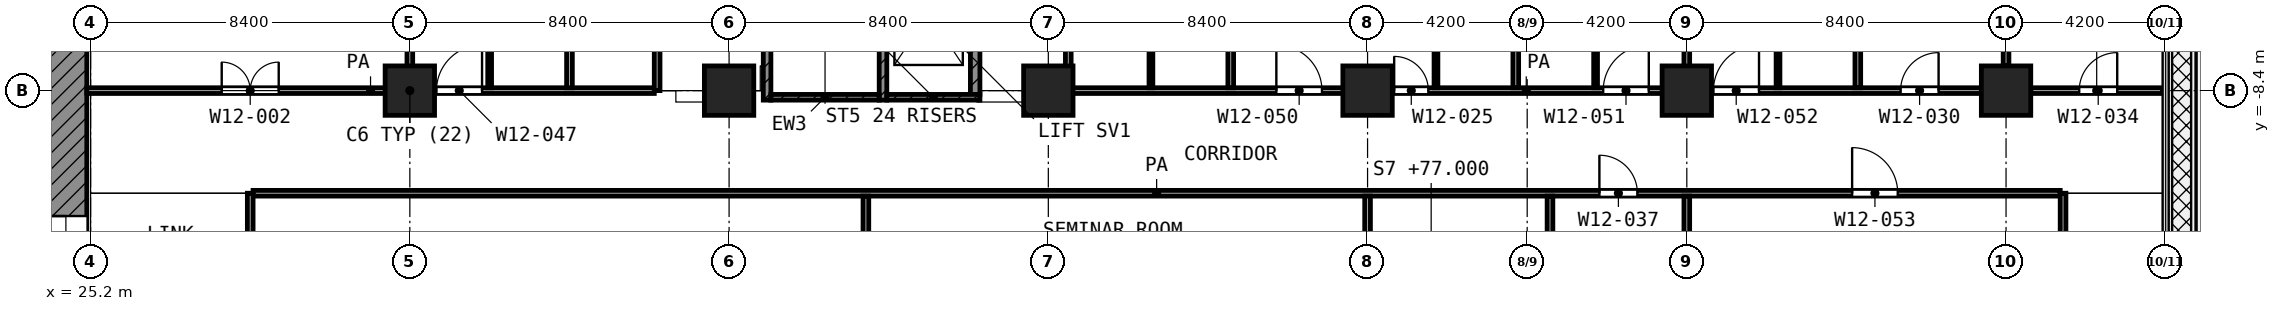
"""IFC4 building model, lengths in metres.
Left out: names, types, materials, properties, quantities, classifications, styles, units other than length and angle.
Written with IfcOpenShell. Run it as: python <this file> out.ifc"""

import sys

from ifc_helpers import new_model, si_unit, direction, frame, frame_2d, origin, origin_2d, place, context, subcontext, project, spatial, rectangle, extrude, element, fill, save


model = new_model("IFC4")
c1 = context("Model", 3, precision=1e-05, world=origin(), true_north=direction((0.0, 1.0)))
c2 = subcontext(c1, "Body", "Model", "MODEL_VIEW")
j1 = project(units=[si_unit("LENGTHUNIT", "METRE"), si_unit("PLANEANGLEUNIT", "RADIAN")], contexts=[c1])
p1 = place(None, origin())
s1 = spatial("IfcSite", under=j1, at=p1, CompositionType="ELEMENT")
p2 = place(p1, origin())
s2 = spatial("IfcBuilding", under=s1, at=p2, CompositionType="ELEMENT")
p3 = place(p2, frame((0.0, 0.0, 77.0)))
s3 = spatial("IfcBuildingStorey", under=s2, at=p3, CompositionType="ELEMENT", Elevation=77.0)
for number, where, z_axis, x_axis in (
    (1, (33.6, -8.4, 0.0), (0.0, 0.0, 1.0), (1.0, 0.0, 0.0)),
    (2, (42.0, -8.4, 0.0), (0.0, 0.0, 1.0), (1.0, 0.0, 0.0)),
    (3, (50.4, -8.4, 0.0), (0.0, 0.0, 1.0), (1.0, 0.0, 0.0)),
    (4, (58.8, -8.4, 0.0), (0.0, 0.0, 1.0), (1.0, 0.0, 0.0)),
    (5, (67.2, -8.4, 0.0), (0.0, 0.0, 1.0), (1.0, 0.0, 0.0)),
    (6, (75.6, -8.4, 0.0), (0.0, 0.0, 1.0), (1.0, 0.0, 0.0)),
):
    element("IfcColumn", number, at=place(p3, frame(where, z_axis=z_axis, x_axis=x_axis)), inside=s3, PredefinedType="COLUMN", context=c2, shape_type="SweptSolid", body=[
        extrude(rectangle(XDim=1.3, YDim=1.3, at=origin_2d()), origin(), (0.0, 0.0, 1.0), 4.2),
    ])
p4 = place(p3, frame((24.55, -24.0, 0.0), z_axis=(0.0, 0.0, 1.0), x_axis=(0.0, 1.0, 0.0)))
e7 = element("IfcWall", 7, at=p4, inside=s3, PredefinedType="SHEAR", context=c2, shape_type="SweptSolid", body=[
    extrude(rectangle(XDim=18.6, YDim=1.1, at=frame_2d((9.3, 0.0))), origin(), (0.0, 0.0, 1.0), 3.9),
])
p5 = place(p4, frame((10.5, 0.0, 0.0)))
e8 = element("IfcOpeningElement", 8, at=p5, cuts=e7, PredefinedType="OPENING", context=c2, shape_type="SweptSolid", body=[
    extrude(rectangle(XDim=1.8, YDim=2.1, at=frame_2d((0.9, 1.05))), frame((0.0, 0.56, 0.0), z_axis=(0.0, -1.0, 0.0), x_axis=(1.0, 0.0, 0.0)), (0.0, 0.0, 1.0), 1.12),
])
p6 = place(p3, frame((43.0, -8.65, 0.0), z_axis=(0.0, 0.0, 1.0), x_axis=(0.0, 1.0, 0.0)))
e9 = element("IfcWall", 9, at=p6, inside=s3, PredefinedType="SHEAR", context=c2, shape_type="SweptSolid", body=[
    extrude(rectangle(XDim=8.35, YDim=0.2, at=frame_2d((4.175, 0.0))), origin(), (0.0, 0.0, 1.0), 3.9),
])
p7 = place(p6, frame((7.0, 0.0, 0.0)))
e10 = element("IfcOpeningElement", 10, at=p7, cuts=e9, PredefinedType="OPENING", context=c2, shape_type="SweptSolid", body=[
    extrude(rectangle(XDim=1.1, YDim=2.1, at=frame_2d((0.55, 1.05))), frame((0.0, 0.11, 0.0), z_axis=(0.0, -1.0, 0.0), x_axis=(1.0, 0.0, 0.0)), (0.0, 0.0, 1.0), 0.22),
])
p8 = place(p3, frame((46.05, -8.65, 0.0), z_axis=(0.0, 0.0, 1.0), x_axis=(0.0, 1.0, 0.0)))
e11 = element("IfcWall", 11, at=p8, inside=s3, PredefinedType="SHEAR", context=c2, shape_type="SweptSolid", body=[
    extrude(rectangle(XDim=8.35, YDim=0.2, at=frame_2d((4.175, 0.0))), origin(), (0.0, 0.0, 1.0), 3.9),
])
p9 = place(p8, frame((7.0, 0.0, 0.0)))
e12 = element("IfcOpeningElement", 12, at=p9, cuts=e11, PredefinedType="OPENING", context=c2, shape_type="SweptSolid", body=[
    extrude(rectangle(XDim=1.1, YDim=2.1, at=frame_2d((0.55, 1.05))), frame((0.0, 0.11, 0.0), z_axis=(0.0, -1.0, 0.0), x_axis=(1.0, 0.0, 0.0)), (0.0, 0.0, 1.0), 0.22),
])
p10 = place(p3, frame((43.1, -8.575, 0.0), z_axis=(0.0, 0.0, 1.0), x_axis=(1.0, 0.0, 0.0)))
e13 = element("IfcWall", 13, at=p10, inside=s3, PredefinedType="SHEAR", context=c2, shape_type="SweptSolid", body=[
    extrude(rectangle(XDim=2.85, YDim=0.15, at=frame_2d((1.425, 0.0))), origin(), (0.0, 0.0, 1.0), 3.9),
])
p11 = place(p3, frame((46.15, -8.575, 0.0), z_axis=(0.0, 0.0, 1.0), x_axis=(1.0, 0.0, 0.0)))
e14 = element("IfcWall", 14, at=p11, inside=s3, PredefinedType="SHEAR", context=c2, shape_type="SweptSolid", body=[
    extrude(rectangle(XDim=2.45, YDim=0.15, at=frame_2d((1.225, 0.0))), origin(), (0.0, 0.0, 1.0), 3.9),
])
p12 = place(p3, frame((48.475, -8.5, 0.0), z_axis=(0.0, 0.0, 1.0), x_axis=(0.0, 1.0, 0.0)))
e15 = element("IfcWall", 15, at=p12, inside=s3, PredefinedType="SHEAR", context=c2, shape_type="SweptSolid", body=[
    extrude(rectangle(XDim=3.475, YDim=0.25, at=frame_2d((1.738, 0.0))), origin(), (0.0, 0.0, 1.0), 3.9),
])
for number, where, z_axis, x_axis in (
    (16, (35.7, -8.325, 0.0), (0.0, 0.0, 1.0), (0.0, 1.0, 0.0)),
    (17, (53.1, -8.325, 0.0), (0.0, 0.0, 1.0), (0.0, 1.0, 0.0)),
):
    element("IfcWall", number, at=place(p3, frame(where, z_axis=z_axis, x_axis=x_axis)), inside=s3, PredefinedType="PARTITIONING", context=c2, shape_type="SweptSolid", body=[
        extrude(rectangle(XDim=2.625, YDim=0.1, at=frame_2d((1.312, 0.0))), origin(), (0.0, 0.0, 1.0), 3.9),
    ])
p13 = place(p3, frame((60.6, -8.325, 0.0), z_axis=(0.0, 0.0, 1.0), x_axis=(0.0, 1.0, 0.0)))
e18 = element("IfcWall", 18, at=p13, inside=s3, PredefinedType="PARTITIONING", context=c2, shape_type="SweptSolid", body=[
    extrude(rectangle(XDim=2.624, YDim=0.1, at=frame_2d((1.312, 0.0))), origin(), (0.0, 0.0, 1.0), 3.9),
])
for number, where, z_axis, x_axis in (
    (19, (64.8, -8.325, 0.0), (0.0, 0.0, 1.0), (0.0, 1.0, 0.0)),
    (20, (69.6, -8.325, 0.0), (0.0, 0.0, 1.0), (0.0, 1.0, 0.0)),
):
    element("IfcWall", number, at=place(p3, frame(where, z_axis=z_axis, x_axis=x_axis)), inside=s3, PredefinedType="PARTITIONING", context=c2, shape_type="SweptSolid", body=[
        extrude(rectangle(XDim=2.625, YDim=0.1, at=frame_2d((1.312, 0.0))), origin(), (0.0, 0.0, 1.0), 3.9),
    ])
p14 = place(p3, frame((29.475, -11.1, 0.0), z_axis=(0.0, 0.0, 1.0), x_axis=(1.0, 0.0, 0.0)))
e21 = element("IfcWall", 21, at=p14, inside=s3, PredefinedType="PARTITIONING", context=c2, shape_type="SweptSolid", body=[
    extrude(rectangle(XDim=47.55, YDim=0.15, at=frame_2d((23.775, 0.0))), origin(), (0.0, 0.0, 1.0), 3.9),
])
p15 = place(p14, frame((35.425, 0.0, 0.0)))
e22 = element("IfcOpeningElement", 22, at=p15, cuts=e21, PredefinedType="OPENING", context=c2, shape_type="SweptSolid", body=[
    extrude(rectangle(XDim=1.0, YDim=2.1, at=frame_2d((0.5, 1.05))), frame((0.0, 0.085, 0.0), z_axis=(0.0, -1.0, 0.0), x_axis=(1.0, 0.0, 0.0)), (0.0, 0.0, 1.0), 0.17),
])
p16 = place(p14, frame((42.075, 0.0, 0.0)))
e23 = element("IfcOpeningElement", 23, at=p16, cuts=e21, PredefinedType="OPENING", context=c2, shape_type="SweptSolid", body=[
    extrude(rectangle(XDim=1.2, YDim=2.1, at=frame_2d((0.6, 1.05))), frame((0.0, 0.085, 0.0), z_axis=(0.0, -1.0, 0.0), x_axis=(1.0, 0.0, 0.0)), (0.0, 0.0, 1.0), 0.17),
])
p17 = place(p3, frame((25.1, -8.4, 0.0), z_axis=(0.0, 0.0, 1.0), x_axis=(1.0, 0.0, 0.0)))
e24 = element("IfcWall", 24, at=p17, inside=s3, PredefinedType="PARTITIONING", context=c2, shape_type="SweptSolid", body=[
    extrude(rectangle(XDim=14.932, YDim=0.15, at=frame_2d((7.466, 0.0))), origin(), (0.0, 0.0, 1.0), 3.9),
])
p18 = place(p17, frame((3.55, 0.0, 0.0)))
e25 = element("IfcOpeningElement", 25, at=p18, cuts=e24, PredefinedType="OPENING", context=c2, shape_type="SweptSolid", body=[
    extrude(rectangle(XDim=1.5, YDim=2.1, at=frame_2d((0.75, 1.05))), frame((0.0, 0.085, 0.0), z_axis=(0.0, -1.0, 0.0), x_axis=(1.0, 0.0, 0.0)), (0.0, 0.0, 1.0), 0.17),
])
p19 = place(p17, frame((9.2, 0.0, 0.0)))
e26 = element("IfcOpeningElement", 26, at=p19, cuts=e24, PredefinedType="OPENING", context=c2, shape_type="SweptSolid", body=[
    extrude(rectangle(XDim=1.2, YDim=2.1, at=frame_2d((0.6, 1.05))), frame((0.0, 0.085, 0.0), z_axis=(0.0, -1.0, 0.0), x_axis=(1.0, 0.0, 0.0)), (0.0, 0.0, 1.0), 0.17),
])
p20 = place(p3, frame((51.0, -8.4, 0.0), z_axis=(0.0, 0.0, 1.0), x_axis=(1.0, 0.0, 0.0)))
e27 = element("IfcWall", 27, at=p20, inside=s3, PredefinedType="PARTITIONING", context=c2, shape_type="SweptSolid", body=[
    extrude(rectangle(XDim=23.95, YDim=0.15, at=frame_2d((11.975, 0.0))), origin(), (0.0, 0.0, 1.0), 3.9),
])
p21 = place(p20, frame((5.4, 0.0, 0.0)))
e28 = element("IfcOpeningElement", 28, at=p21, cuts=e27, PredefinedType="OPENING", context=c2, shape_type="SweptSolid", body=[
    extrude(rectangle(XDim=1.2, YDim=2.1, at=frame_2d((0.6, 1.05))), frame((0.0, 0.085, 0.0), z_axis=(0.0, -1.0, 0.0), x_axis=(1.0, 0.0, 0.0)), (0.0, 0.0, 1.0), 0.17),
])
p22 = place(p20, frame((8.5, 0.0, 0.0)))
e29 = element("IfcOpeningElement", 29, at=p22, cuts=e27, PredefinedType="OPENING", context=c2, shape_type="SweptSolid", body=[
    extrude(rectangle(XDim=0.9, YDim=2.1, at=frame_2d((0.45, 1.05))), frame((0.0, 0.085, 0.0), z_axis=(0.0, -1.0, 0.0), x_axis=(1.0, 0.0, 0.0)), (0.0, 0.0, 1.0), 0.17),
])
p23 = place(p20, frame((14.0, 0.0, 0.0)))
e30 = element("IfcOpeningElement", 30, at=p23, cuts=e27, PredefinedType="OPENING", context=c2, shape_type="SweptSolid", body=[
    extrude(rectangle(XDim=1.2, YDim=2.1, at=frame_2d((0.6, 1.05))), frame((0.0, 0.085, 0.0), z_axis=(0.0, -1.0, 0.0), x_axis=(1.0, 0.0, 0.0)), (0.0, 0.0, 1.0), 0.17),
])
p24 = place(p20, frame((16.9, 0.0, 0.0)))
e31 = element("IfcOpeningElement", 31, at=p24, cuts=e27, PredefinedType="OPENING", context=c2, shape_type="SweptSolid", body=[
    extrude(rectangle(XDim=1.2, YDim=2.1, at=frame_2d((0.6, 1.05))), frame((0.0, 0.085, 0.0), z_axis=(0.0, -1.0, 0.0), x_axis=(1.0, 0.0, 0.0)), (0.0, 0.0, 1.0), 0.17),
])
p25 = place(p20, frame((21.825, 0.0, 0.0)))
e32 = element("IfcOpeningElement", 32, at=p25, cuts=e27, PredefinedType="OPENING", context=c2, shape_type="SweptSolid", body=[
    extrude(rectangle(XDim=1.0, YDim=2.1, at=frame_2d((0.5, 1.05))), frame((0.0, 0.085, 0.0), z_axis=(0.0, -1.0, 0.0), x_axis=(1.0, 0.0, 0.0)), (0.0, 0.0, 1.0), 0.17),
])
p26 = place(p3, frame((76.25, -8.4, 0.0), z_axis=(0.0, 0.0, 1.0), x_axis=(1.0, 0.0, 0.0)))
e33 = element("IfcWall", 33, at=p26, inside=s3, PredefinedType="PARTITIONING", context=c2, shape_type="SweptSolid", body=[
    extrude(rectangle(XDim=3.47, YDim=0.15, at=frame_2d((1.735, 0.0))), origin(), (0.0, 0.0, 1.0), 3.9),
])
p27 = place(p26, frame((1.275, 0.0, 0.0)))
e34 = element("IfcOpeningElement", 34, at=p27, cuts=e33, PredefinedType="OPENING", context=c2, shape_type="SweptSolid", body=[
    extrude(rectangle(XDim=1.0, YDim=2.1, at=frame_2d((0.5, 1.05))), frame((0.0, 0.085, 0.0), z_axis=(0.0, -1.0, 0.0), x_axis=(1.0, 0.0, 0.0)), (0.0, 0.0, 1.0), 0.17),
])
p28 = place(p3, frame((29.4, -14.1, 0.0), z_axis=(0.0, 0.0, 1.0), x_axis=(0.0, 1.0, 0.0)))
e35 = element("IfcWall", 35, at=p28, inside=s3, PredefinedType="PARTITIONING", context=c2, shape_type="SweptSolid", body=[
    extrude(rectangle(XDim=3.0, YDim=0.15, at=frame_2d((1.5, 0.0))), origin(), (0.0, 0.0, 1.0), 3.9),
])
for number, where, z_axis, x_axis in (
    (36, (33.6, -8.325, 0.0), (0.0, 0.0, 1.0), (0.0, 1.0, 0.0)),
    (37, (37.8, -8.325, 0.0), (0.0, 0.0, 1.0), (0.0, 1.0, 0.0)),
):
    element("IfcWall", number, at=place(p3, frame(where, z_axis=z_axis, x_axis=x_axis)), inside=s3, PredefinedType="PARTITIONING", context=c2, shape_type="SweptSolid", body=[
        extrude(rectangle(XDim=8.245, YDim=0.15, at=frame_2d((4.123, 0.0))), origin(), (0.0, 0.0, 1.0), 3.9),
    ])
p29 = place(p3, frame((40.107, -8.4, 0.0), z_axis=(0.0, 0.0, 1.0), x_axis=(0.0, 1.0, 0.0)))
e38 = element("IfcWall", 38, at=p29, inside=s3, PredefinedType="PARTITIONING", context=c2, shape_type="SweptSolid", body=[
    extrude(rectangle(XDim=8.048, YDim=0.15, at=frame_2d((4.024, 0.0))), origin(), (0.0, 0.0, 1.0), 3.9),
])
p30 = place(p29, frame((3.524, 0.0, 0.0)))
e39 = element("IfcOpeningElement", 39, at=p30, cuts=e38, PredefinedType="OPENING", context=c2, shape_type="SweptSolid", body=[
    extrude(rectangle(XDim=1.0, YDim=2.1, at=frame_2d((0.5, 1.05))), frame((0.0, 0.085, 0.0), z_axis=(0.0, -1.0, 0.0), x_axis=(1.0, 0.0, 0.0)), (0.0, 0.0, 1.0), 0.17),
])
p31 = place(p3, frame((45.6, -14.025, 0.0), z_axis=(0.0, 0.0, 1.0), x_axis=(0.0, 1.0, 0.0)))
e40 = element("IfcWall", 40, at=p31, inside=s3, PredefinedType="PARTITIONING", context=c2, shape_type="SweptSolid", body=[
    extrude(rectangle(XDim=2.85, YDim=0.15, at=frame_2d((1.425, 0.0))), origin(), (0.0, 0.0, 1.0), 3.9),
])
p32 = place(p3, frame((50.925, -8.4, 0.0), z_axis=(0.0, 0.0, 1.0), x_axis=(0.0, 1.0, 0.0)))
e41 = element("IfcWall", 41, at=p32, inside=s3, PredefinedType="PARTITIONING", context=c2, shape_type="SweptSolid", body=[
    extrude(rectangle(XDim=6.55, YDim=0.15, at=frame_2d((3.275, 0.0))), origin(), (0.0, 0.0, 1.0), 3.9),
])
p33 = place(p32, frame((3.767, 0.0, 0.0)))
e42 = element("IfcOpeningElement", 42, at=p33, cuts=e41, PredefinedType="OPENING", context=c2, shape_type="SweptSolid", body=[
    extrude(rectangle(XDim=1.2, YDim=2.1, at=frame_2d((0.6, 1.05))), frame((0.0, 0.085, 0.0), z_axis=(0.0, -1.0, 0.0), x_axis=(1.0, 0.0, 0.0)), (0.0, 0.0, 1.0), 0.17),
])
p34 = place(p32, frame((1.583, 0.0, 0.0)))
e43 = element("IfcOpeningElement", 43, at=p34, cuts=e41, PredefinedType="OPENING", context=c2, shape_type="SweptSolid", body=[
    extrude(rectangle(XDim=1.2, YDim=2.1, at=frame_2d((0.6, 1.05))), frame((0.0, 0.085, 0.0), z_axis=(0.0, -1.0, 0.0), x_axis=(1.0, 0.0, 0.0)), (0.0, 0.0, 1.0), 0.17),
])
p35 = place(p3, frame((55.2, -8.325, 0.0), z_axis=(0.0, 0.0, 1.0), x_axis=(0.0, 1.0, 0.0)))
e44 = element("IfcWall", 44, at=p35, inside=s3, PredefinedType="PARTITIONING", context=c2, shape_type="SweptSolid", body=[
    extrude(rectangle(XDim=8.245, YDim=0.15, at=frame_2d((4.123, 0.0))), origin(), (0.0, 0.0, 1.0), 3.9),
])
p36 = place(p3, frame((58.8, -14.025, 0.0), z_axis=(0.0, 0.0, 1.0), x_axis=(0.0, 1.0, 0.0)))
e45 = element("IfcWall", 45, at=p36, inside=s3, PredefinedType="PARTITIONING", context=c2, shape_type="SweptSolid", body=[
    extrude(rectangle(XDim=2.85, YDim=0.15, at=frame_2d((1.425, 0.0))), origin(), (0.0, 0.0, 1.0), 3.9),
])
p37 = place(p3, frame((62.7, -8.325, 0.0), z_axis=(0.0, 0.0, 1.0), x_axis=(0.0, 1.0, 0.0)))
e46 = element("IfcWall", 46, at=p37, inside=s3, PredefinedType="PARTITIONING", context=c2, shape_type="SweptSolid", body=[
    extrude(rectangle(XDim=8.245, YDim=0.15, at=frame_2d((4.123, 0.0))), origin(), (0.0, 0.0, 1.0), 3.9),
])
for number, where, z_axis, x_axis in (
    (47, (63.6, -14.025, 0.0), (0.0, 0.0, 1.0), (0.0, 1.0, 0.0)),
    (48, (67.2, -14.025, 0.0), (0.0, 0.0, 1.0), (0.0, 1.0, 0.0)),
):
    element("IfcWall", number, at=place(p3, frame(where, z_axis=z_axis, x_axis=x_axis)), inside=s3, PredefinedType="PARTITIONING", context=c2, shape_type="SweptSolid", body=[
        extrude(rectangle(XDim=2.85, YDim=0.15, at=frame_2d((1.425, 0.0))), origin(), (0.0, 0.0, 1.0), 3.9),
    ])
for number, where, z_axis, x_axis in (
    (49, (67.2, -8.325, 0.0), (0.0, 0.0, 1.0), (0.0, 1.0, 0.0)),
    (50, (71.7, -8.325, 0.0), (0.0, 0.0, 1.0), (0.0, 1.0, 0.0)),
):
    element("IfcWall", number, at=place(p3, frame(where, z_axis=z_axis, x_axis=x_axis)), inside=s3, PredefinedType="PARTITIONING", context=c2, shape_type="SweptSolid", body=[
        extrude(rectangle(XDim=8.245, YDim=0.15, at=frame_2d((4.123, 0.0))), origin(), (0.0, 0.0, 1.0), 3.9),
    ])
p38 = place(p3, frame((75.6, -7.75, 0.0), z_axis=(0.0, 0.0, 1.0), x_axis=(0.0, 1.0, 0.0)))
e51 = element("IfcWall", 51, at=p38, inside=s3, PredefinedType="PARTITIONING", context=c2, shape_type="SweptSolid", body=[
    extrude(rectangle(XDim=5.837, YDim=0.15, at=frame_2d((2.918, 0.0))), origin(), (0.0, 0.0, 1.0), 3.9),
])
p39 = place(p3, frame((77.1, -14.1, 0.0), z_axis=(0.0, 0.0, 1.0), x_axis=(0.0, 1.0, 0.0)))
e52 = element("IfcWall", 52, at=p39, inside=s3, PredefinedType="PARTITIONING", context=c2, shape_type="SweptSolid", body=[
    extrude(rectangle(XDim=3.0, YDim=0.15, at=frame_2d((1.5, 0.0))), origin(), (0.0, 0.0, 1.0), 3.9),
])
p40 = place(p5, origin())
e53 = element("IfcDoor", 53, at=p40, inside=s3, OperationType="DOUBLE_DOOR_SINGLE_SWING", PredefinedType="DOOR", context=c2, shape_type="SweptSolid", body=[
    extrude(rectangle(XDim=1.8, YDim=2.1, at=frame_2d((0.9, 1.05))), frame((0.0, 0.025, 0.0), z_axis=(0.0, -1.0, 0.0), x_axis=(1.0, 0.0, 0.0)), (0.0, 0.0, 1.0), 0.05),
])
fill(e8, e53)
p41 = place(p18, origin())
e54 = element("IfcDoor", 54, at=p41, inside=s3, OperationType="DOUBLE_DOOR_SINGLE_SWING", PredefinedType="DOOR", context=c2, shape_type="SweptSolid", body=[
    extrude(rectangle(XDim=1.5, YDim=2.1, at=frame_2d((0.75, 1.05))), frame((0.0, 0.025, 0.0), z_axis=(0.0, -1.0, 0.0), x_axis=(1.0, 0.0, 0.0)), (0.0, 0.0, 1.0), 0.05),
])
fill(e25, e54)
p42 = place(p19, origin())
e55 = element("IfcDoor", 55, at=p42, inside=s3, OperationType="SINGLE_SWING_RIGHT", PredefinedType="DOOR", context=c2, shape_type="SweptSolid", body=[
    extrude(rectangle(XDim=1.2, YDim=2.1, at=frame_2d((0.6, 1.05))), frame((0.0, 0.025, 0.0), z_axis=(0.0, -1.0, 0.0), x_axis=(1.0, 0.0, 0.0)), (0.0, 0.0, 1.0), 0.05),
])
fill(e26, e55)
p43 = place(p21, origin())
e56 = element("IfcDoor", 56, at=p43, inside=s3, OperationType="SINGLE_SWING_LEFT", PredefinedType="DOOR", context=c2, shape_type="SweptSolid", body=[
    extrude(rectangle(XDim=1.2, YDim=2.1, at=frame_2d((0.6, 1.05))), frame((0.0, 0.025, 0.0), z_axis=(0.0, -1.0, 0.0), x_axis=(1.0, 0.0, 0.0)), (0.0, 0.0, 1.0), 0.05),
])
fill(e28, e56)
p44 = place(p22, origin())
e57 = element("IfcDoor", 57, at=p44, inside=s3, OperationType="SINGLE_SWING_LEFT", PredefinedType="DOOR", context=c2, shape_type="SweptSolid", body=[
    extrude(rectangle(XDim=0.9, YDim=2.1, at=frame_2d((0.45, 1.05))), frame((0.0, 0.025, 0.0), z_axis=(0.0, -1.0, 0.0), x_axis=(1.0, 0.0, 0.0)), (0.0, 0.0, 1.0), 0.05),
])
fill(e29, e57)
p45 = place(p23, origin())
e58 = element("IfcDoor", 58, at=p45, inside=s3, OperationType="SINGLE_SWING_RIGHT", PredefinedType="DOOR", context=c2, shape_type="SweptSolid", body=[
    extrude(rectangle(XDim=1.2, YDim=2.1, at=frame_2d((0.6, 1.05))), frame((0.0, 0.025, 0.0), z_axis=(0.0, -1.0, 0.0), x_axis=(1.0, 0.0, 0.0)), (0.0, 0.0, 1.0), 0.05),
])
fill(e30, e58)
p46 = place(p24, origin())
e59 = element("IfcDoor", 59, at=p46, inside=s3, OperationType="SINGLE_SWING_RIGHT", PredefinedType="DOOR", context=c2, shape_type="SweptSolid", body=[
    extrude(rectangle(XDim=1.2, YDim=2.1, at=frame_2d((0.6, 1.05))), frame((0.0, 0.025, 0.0), z_axis=(0.0, -1.0, 0.0), x_axis=(1.0, 0.0, 0.0)), (0.0, 0.0, 1.0), 0.05),
])
fill(e31, e59)
p47 = place(p25, origin())
e60 = element("IfcDoor", 60, at=p47, inside=s3, OperationType="SINGLE_SWING_RIGHT", PredefinedType="DOOR", context=c2, shape_type="SweptSolid", body=[
    extrude(rectangle(XDim=1.0, YDim=2.1, at=frame_2d((0.5, 1.05))), frame((0.0, 0.025, 0.0), z_axis=(0.0, -1.0, 0.0), x_axis=(1.0, 0.0, 0.0)), (0.0, 0.0, 1.0), 0.05),
])
fill(e32, e60)
p48 = place(p27, origin())
e61 = element("IfcDoor", 61, at=p48, inside=s3, OperationType="SINGLE_SWING_RIGHT", PredefinedType="DOOR", context=c2, shape_type="SweptSolid", body=[
    extrude(rectangle(XDim=1.0, YDim=2.1, at=frame_2d((0.5, 1.05))), frame((0.0, 0.025, 0.0), z_axis=(0.0, -1.0, 0.0), x_axis=(1.0, 0.0, 0.0)), (0.0, 0.0, 1.0), 0.05),
])
fill(e34, e61)
p49 = place(p15, origin())
e62 = element("IfcDoor", 62, at=p49, inside=s3, OperationType="SINGLE_SWING_LEFT", PredefinedType="DOOR", context=c2, shape_type="SweptSolid", body=[
    extrude(rectangle(XDim=1.0, YDim=2.1, at=frame_2d((0.5, 1.05))), frame((0.0, 0.025, 0.0), z_axis=(0.0, -1.0, 0.0), x_axis=(1.0, 0.0, 0.0)), (0.0, 0.0, 1.0), 0.05),
])
fill(e22, e62)
p50 = place(p16, origin())
e63 = element("IfcDoor", 63, at=p50, inside=s3, OperationType="SINGLE_SWING_LEFT", PredefinedType="DOOR", context=c2, shape_type="SweptSolid", body=[
    extrude(rectangle(XDim=1.2, YDim=2.1, at=frame_2d((0.6, 1.05))), frame((0.0, 0.025, 0.0), z_axis=(0.0, -1.0, 0.0), x_axis=(1.0, 0.0, 0.0)), (0.0, 0.0, 1.0), 0.05),
])
fill(e23, e63)
save(model, sys.argv[1])
